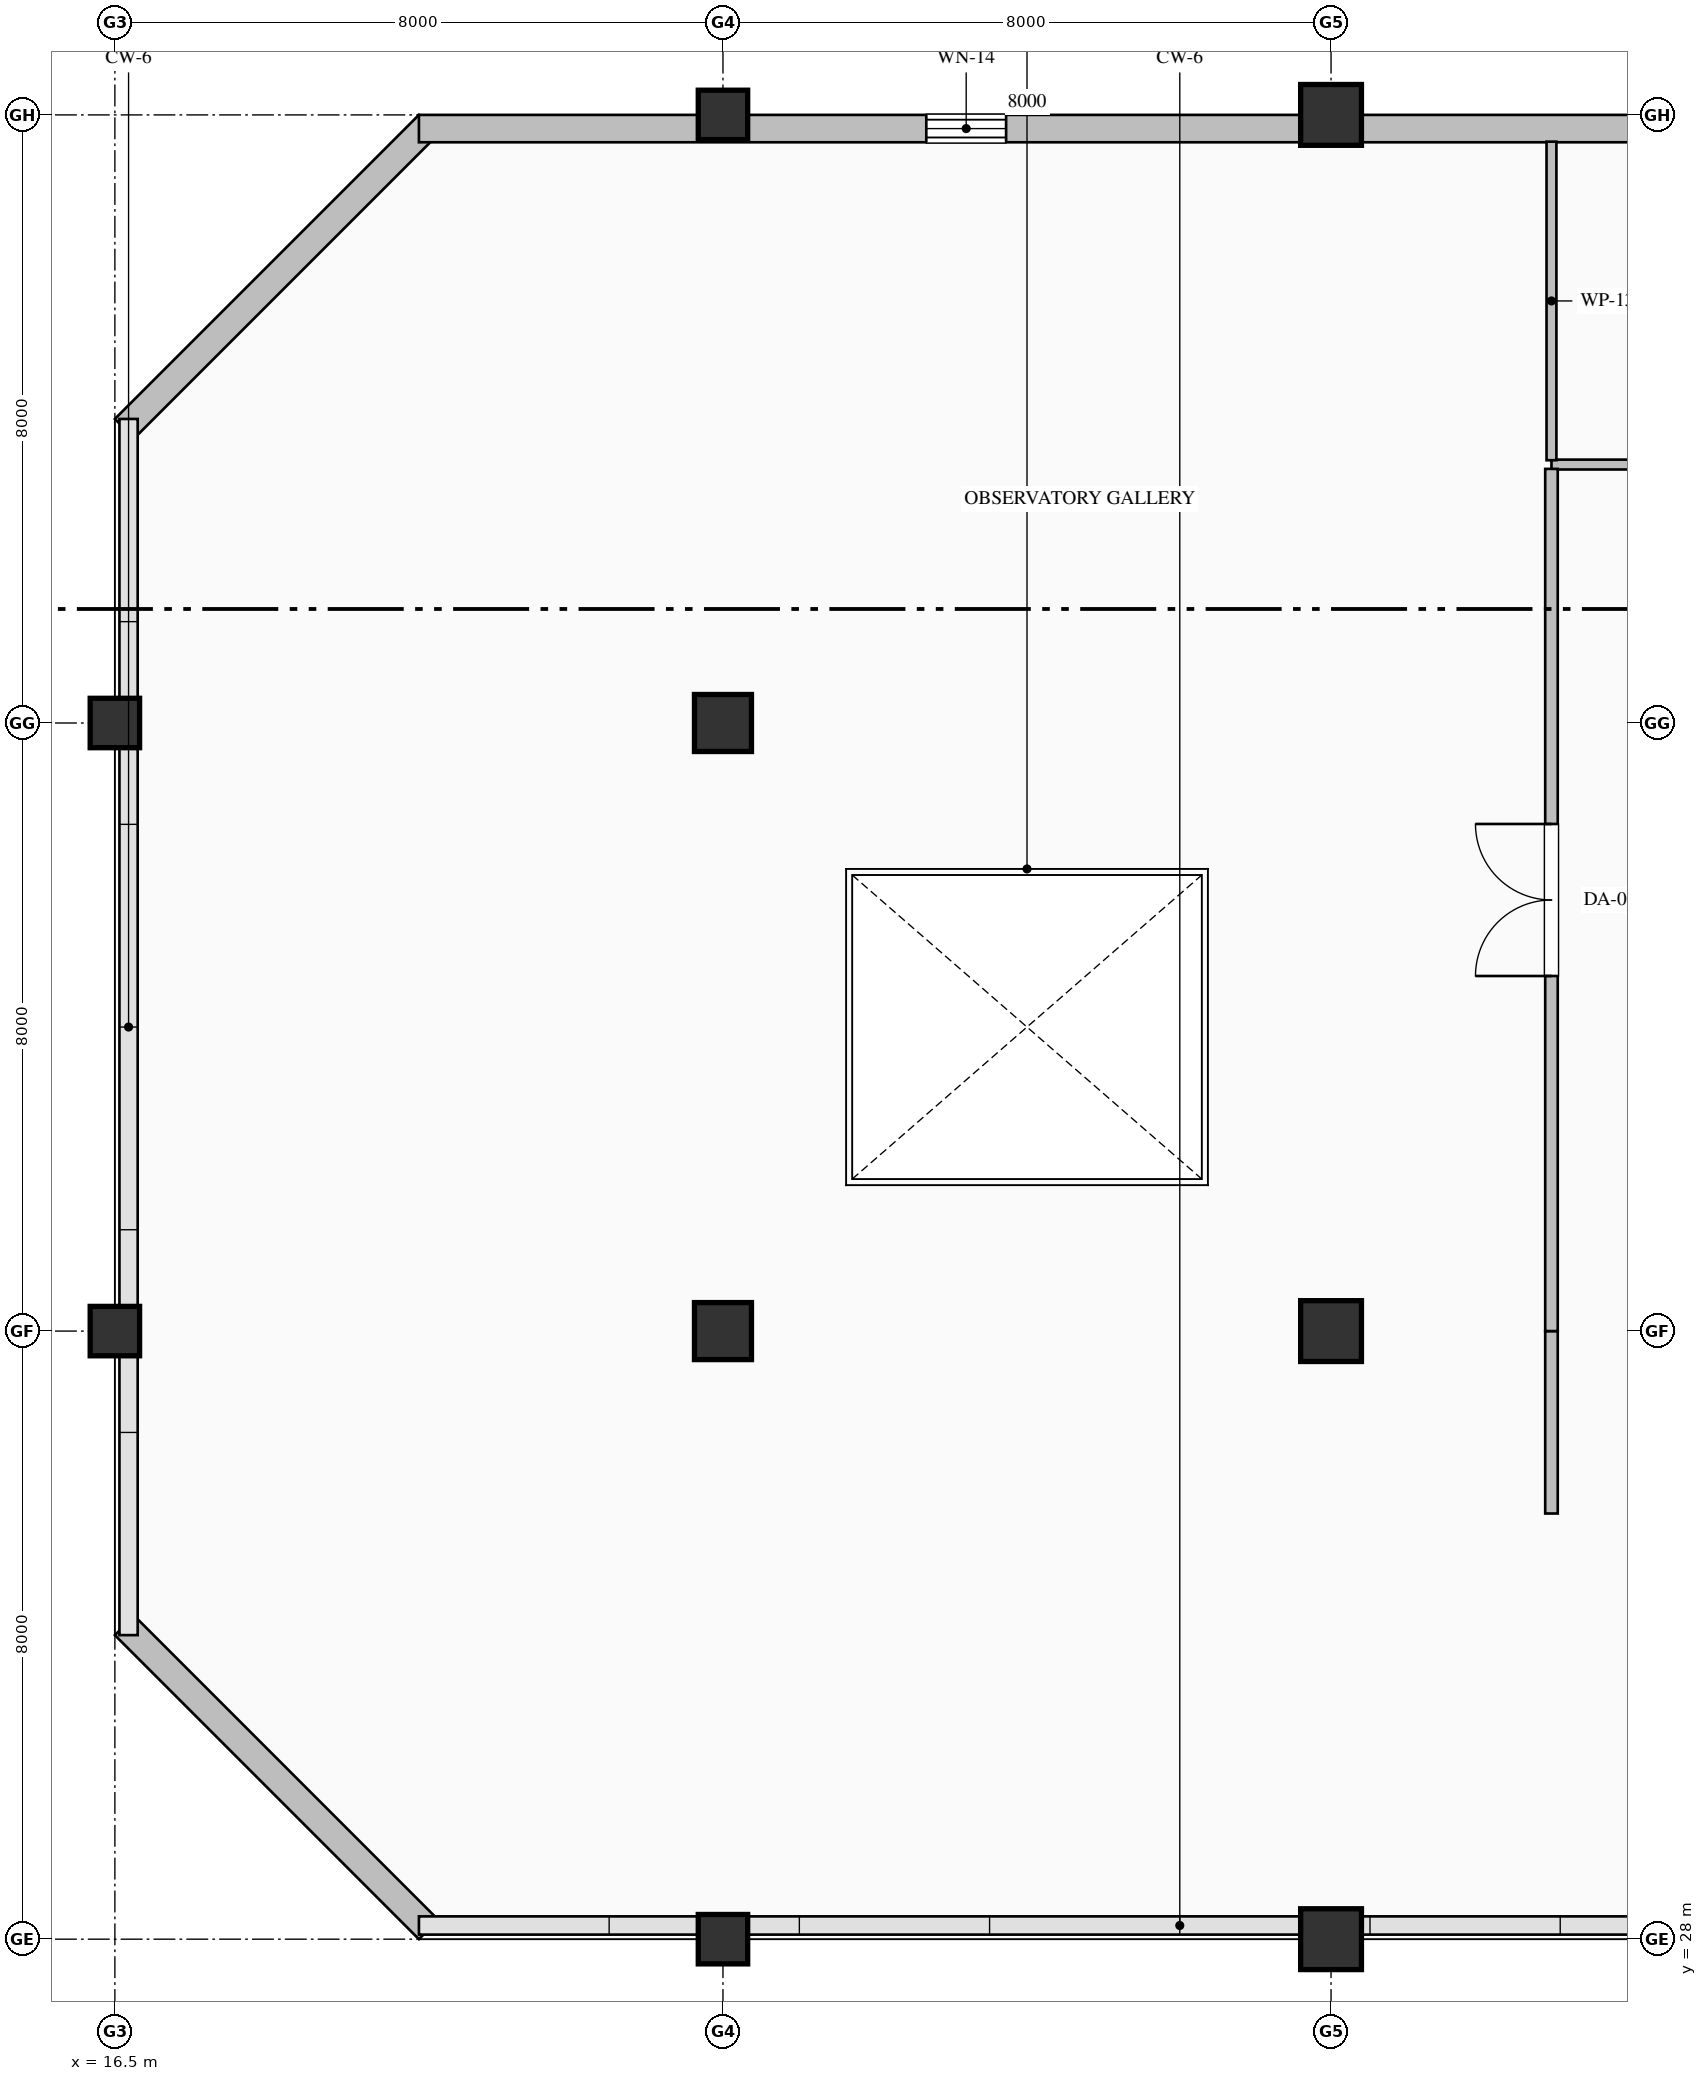
"""IFC4 building model, lengths in metres.
Left out: names, types, materials, properties, quantities, classifications, styles, units other than length and angle.
Written with IfcOpenShell. Run it as: python <this file> out.ifc"""

import sys

from ifc_helpers import new_model, si_unit, direction, frame, frame_2d, origin, origin_2d, place, context, subcontext, project, spatial, rectangle, hollow_rectangle, extrude, element, fill, save


model = new_model("IFC4")
c1 = context("Model", 3, precision=1e-05, world=origin(), true_north=direction((0.0, 1.0)))
c2 = subcontext(c1, "Body", "Model", "MODEL_VIEW")
j1 = project(units=[si_unit("LENGTHUNIT", "METRE"), si_unit("PLANEANGLEUNIT", "RADIAN")], contexts=[c1])
p1 = place(None, origin())
s1 = spatial("IfcSite", under=j1, at=p1, CompositionType="ELEMENT")
p2 = place(p1, origin())
s2 = spatial("IfcBuilding", under=s1, at=p2, CompositionType="ELEMENT")
p3 = place(p2, frame((0.0, 0.0, 378.4)))
s3 = spatial("IfcBuildingStorey", under=s2, at=p3, CompositionType="ELEMENT", Elevation=378.4)
for number, where, z_axis, x_axis in (
    (1, (16.5, 36.0, 0.0), (0.0, 0.0, 1.0), (1.0, 0.0, 0.0)),
    (2, (16.5, 44.0, 0.0), (0.0, 0.0, 1.0), (1.0, 0.0, 0.0)),
    (3, (24.5, 28.0, 0.0), (0.0, 0.0, 1.0), (1.0, 0.0, 0.0)),
):
    element("IfcColumn", number, at=place(p3, frame(where, z_axis=z_axis, x_axis=x_axis)), inside=s3, PredefinedType="COLUMN", context=c2, shape_type="SweptSolid", body=[
        extrude(hollow_rectangle(XDim=0.65, YDim=0.65, WallThickness=0.028, at=origin_2d()), origin(), (0.0, 0.0, 1.0), 5.4),
    ])
for number, where, z_axis, x_axis in (
    (4, (24.5, 36.0, 0.0), (0.0, 0.0, 1.0), (1.0, 0.0, 0.0)),
    (5, (24.5, 44.0, 0.0), (0.0, 0.0, 1.0), (1.0, 0.0, 0.0)),
):
    element("IfcColumn", number, at=place(p3, frame(where, z_axis=z_axis, x_axis=x_axis)), inside=s3, PredefinedType="COLUMN", context=c2, shape_type="SweptSolid", body=[
        extrude(rectangle(XDim=0.75, YDim=0.75, at=origin_2d()), origin(), (0.0, 0.0, 1.0), 5.4),
    ])
p4 = place(p3, frame((24.5, 52.0, 0.0), z_axis=(0.0, 0.0, 1.0), x_axis=(1.0, 0.0, 0.0)))
e6 = element("IfcColumn", 6, at=p4, inside=s3, PredefinedType="COLUMN", context=c2, shape_type="SweptSolid", body=[
    extrude(hollow_rectangle(XDim=0.65, YDim=0.65, WallThickness=0.028, at=origin_2d()), origin(), (0.0, 0.0, 1.0), 5.4),
])
for number, where, z_axis, x_axis in (
    (7, (32.5, 28.0, 0.0), (0.0, 0.0, 1.0), (1.0, 0.0, 0.0)),
    (8, (32.5, 36.0, 0.0), (0.0, 0.0, 1.0), (1.0, 0.0, 0.0)),
    (9, (32.5, 52.0, 0.0), (0.0, 0.0, 1.0), (1.0, 0.0, 0.0)),
):
    element("IfcColumn", number, at=place(p3, frame(where, z_axis=z_axis, x_axis=x_axis)), inside=s3, PredefinedType="COLUMN", context=c2, shape_type="SweptSolid", body=[
        extrude(hollow_rectangle(XDim=0.8, YDim=0.8, WallThickness=0.032, at=origin_2d()), origin(), (0.0, 0.0, 1.0), 5.4),
    ])
for number, where, z_axis, x_axis in (
    (10, (20.627, 28.127, 0.0), (0.0, 0.0, 1.0), (-0.707, 0.707, 0.0)),
    (11, (16.627, 47.873, 0.0), (0.0, 0.0, 1.0), (0.707, 0.707, 0.0)),
):
    element("IfcWall", number, at=place(p3, frame(where, z_axis=z_axis, x_axis=x_axis)), inside=s3, PredefinedType="SOLIDWALL", context=c2, shape_type="SweptSolid", body=[
        extrude(rectangle(XDim=5.657, YDim=0.36, at=frame_2d((2.828, 0.0))), origin(), (0.0, 0.0, 1.0), 4.95),
    ])
p5 = place(p3, frame((20.5, 51.82, 0.0), z_axis=(0.0, 0.0, 1.0), x_axis=(1.0, 0.0, 0.0)))
e12 = element("IfcWall", 12, at=p5, inside=s3, PredefinedType="SOLIDWALL", context=c2, shape_type="SweptSolid", body=[
    extrude(rectangle(XDim=20.02, YDim=0.36, at=frame_2d((10.01, 0.0))), origin(), (0.0, 0.0, 1.0), 4.5),
])
p6 = place(p5, frame((6.675, 0.0, 0.8)))
e13 = element("IfcOpeningElement", 13, at=p6, cuts=e12, PredefinedType="OPENING", context=c2, shape_type="SweptSolid", body=[
    extrude(rectangle(XDim=1.05, YDim=2.15, at=frame_2d((0.525, 1.075))), frame((0.0, 0.19, 0.0), z_axis=(0.0, -1.0, 0.0), x_axis=(1.0, 0.0, 0.0)), (0.0, 0.0, 1.0), 0.38),
])
p7 = place(p3, frame((37.8, 47.4, 0.0), z_axis=(0.0, 0.0, 1.0), x_axis=(-1.0, 0.0, 0.0)))
e14 = element("IfcWall", 14, at=p7, inside=s3, PredefinedType="PARTITIONING", context=c2, shape_type="SweptSolid", body=[
    extrude(rectangle(XDim=2.4, YDim=0.13, at=frame_2d((1.2, 0.0))), origin(), (0.0, 0.0, 1.0), 4.95),
])
p8 = place(p3, frame((35.4, 47.457, 0.0), z_axis=(0.0, 0.0, 1.0), x_axis=(0.0, 1.0, 0.0)))
e15 = element("IfcWall", 15, at=p8, inside=s3, PredefinedType="PARTITIONING", context=c2, shape_type="SweptSolid", body=[
    extrude(rectangle(XDim=4.191, YDim=0.13, at=frame_2d((2.095, 0.0))), origin(), (0.0, 0.0, 1.0), 4.95),
])
p9 = place(p3, frame((35.4, 33.6, 0.0), z_axis=(0.0, 0.0, 1.0), x_axis=(0.0, 1.0, 0.0)))
e16 = element("IfcWall", 16, at=p9, inside=s3, PredefinedType="PARTITIONING", context=c2, shape_type="SweptSolid", body=[
    extrude(rectangle(XDim=2.4, YDim=0.165, at=frame_2d((1.2, 0.0))), origin(), (0.0, 0.0, 1.0), 4.95),
])
p10 = place(p3, frame((35.4, 36.0, 0.0), z_axis=(0.0, 0.0, 1.0), x_axis=(0.0, 1.0, 0.0)))
e17 = element("IfcWall", 17, at=p10, inside=s3, PredefinedType="PARTITIONING", context=c2, shape_type="SweptSolid", body=[
    extrude(rectangle(XDim=11.343, YDim=0.165, at=frame_2d((5.671, 0.0))), origin(), (0.0, 0.0, 1.0), 4.95),
])
p11 = place(p10, frame((4.671, 0.0, 0.0)))
e18 = element("IfcOpeningElement", 18, at=p11, cuts=e17, PredefinedType="OPENING", context=c2, shape_type="SweptSolid", body=[
    extrude(rectangle(XDim=2.0, YDim=2.4, at=frame_2d((1.0, 1.2))), frame((0.0, 0.093, 0.0), z_axis=(0.0, -1.0, 0.0), x_axis=(1.0, 0.0, 0.0)), (0.0, 0.0, 1.0), 0.185),
])
p12 = place(p6, origin())
e19 = element("IfcWindow", 19, at=p12, inside=s3, PartitioningType="SINGLE_PANEL", PredefinedType="WINDOW", context=c2, shape_type="SweptSolid", body=[
    extrude(rectangle(XDim=1.05, YDim=2.15, at=frame_2d((0.525, 1.075))), frame((0.0, 0.15, 0.0), z_axis=(0.0, -1.0, 0.0), x_axis=(1.0, 0.0, 0.0)), (0.0, 0.0, 1.0), 0.06),
])
fill(e13, e19)
p13 = place(p11, origin())
e20 = element("IfcDoor", 20, at=p13, inside=s3, OperationType="DOUBLE_DOOR_SINGLE_SWING", PredefinedType="DOOR", context=c2, shape_type="SweptSolid", body=[
    extrude(rectangle(XDim=2.0, YDim=2.4, at=frame_2d((1.0, 1.2))), frame((0.0, 0.025, 0.0), z_axis=(0.0, -1.0, 0.0), x_axis=(1.0, 0.0, 0.0)), (0.0, 0.0, 1.0), 0.05),
])
fill(e18, e20)
save(model, sys.argv[1])
